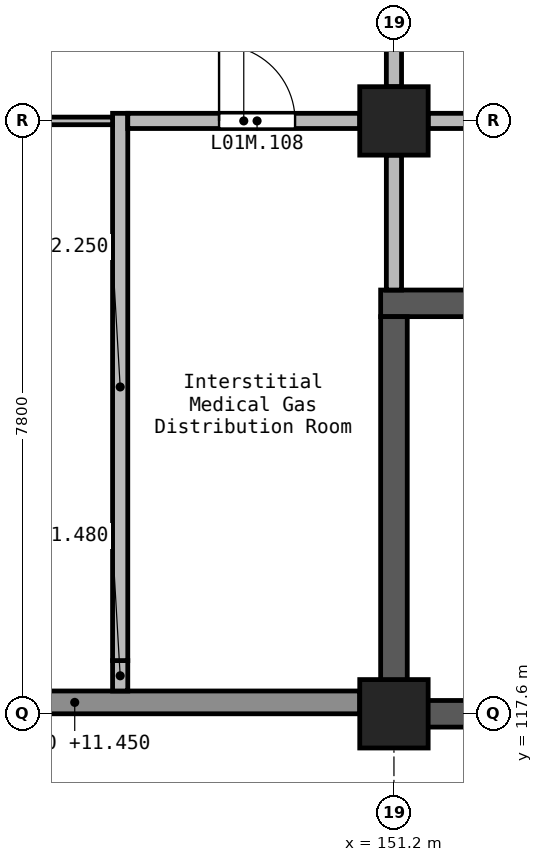
"""IFC4 building model, lengths in metres.
Left out: names, types, materials, properties, quantities, classifications, styles, units other than length and angle.
Written with IfcOpenShell. Run it as: python <this file> out.ifc"""

import sys

from ifc_helpers import new_model, si_unit, direction, frame, frame_2d, origin, origin_2d, place, context, subcontext, project, spatial, rectangle, extrude, element, fill, save


model = new_model("IFC4")
c1 = context("Model", 3, precision=1e-05, world=origin(), true_north=direction((0.0, 1.0)))
c2 = subcontext(c1, "Body", "Model", "MODEL_VIEW")
j1 = project(units=[si_unit("LENGTHUNIT", "METRE"), si_unit("PLANEANGLEUNIT", "RADIAN")], contexts=[c1])
p1 = place(None, origin())
s1 = spatial("IfcSite", under=j1, at=p1, CompositionType="ELEMENT")
p2 = place(p1, origin())
s2 = spatial("IfcBuilding", under=s1, at=p2, CompositionType="ELEMENT")
p3 = place(p2, frame((0.0, 0.0, 9.9)))
s3 = spatial("IfcBuildingStorey", under=s2, at=p3, CompositionType="ELEMENT", Elevation=9.9)
for number, where, z_axis, x_axis in (
    (1, (151.2, 117.6, 0.0), (0.0, 0.0, 1.0), (1.0, 0.0, 0.0)),
    (2, (151.2, 125.4, 0.0), (0.0, 0.0, 1.0), (1.0, 0.0, 0.0)),
):
    element("IfcColumn", number, at=place(p3, frame(where, z_axis=z_axis, x_axis=x_axis)), inside=s3, PredefinedType="COLUMN", context=c2, shape_type="SweptSolid", body=[
        extrude(rectangle(XDim=0.9, YDim=0.9, at=origin_2d()), origin(), (0.0, 0.0, 1.0), 2.7),
    ])
p4 = place(p3, frame((151.025, 123.0, 0.0), z_axis=(0.0, 0.0, 1.0), x_axis=(1.0, 0.0, 0.0)))
e3 = element("IfcWall", 3, at=p4, inside=s3, PredefinedType="SHEAR", context=c2, shape_type="SweptSolid", body=[
    extrude(rectangle(XDim=8.4, YDim=0.35, at=frame_2d((4.2, 0.0))), origin(), (0.0, 0.0, 1.0), 2.7),
])
p5 = place(p4, frame((6.875, 0.0, 0.0)))
e4 = element("IfcOpeningElement", 4, at=p5, cuts=e3, PredefinedType="OPENING", context=c2, shape_type="SweptSolid", body=[
    extrude(rectangle(XDim=1.1, YDim=2.1, at=frame_2d((0.55, 1.05))), frame((0.0, 0.185, 0.0), z_axis=(0.0, -1.0, 0.0), x_axis=(1.0, 0.0, 0.0)), (0.0, 0.0, 1.0), 0.37),
])
p6 = place(p3, frame((151.2, 117.425, 0.0), z_axis=(0.0, 0.0, 1.0), x_axis=(0.0, 1.0, 0.0)))
e5 = element("IfcWall", 5, at=p6, inside=s3, PredefinedType="SHEAR", context=c2, shape_type="SweptSolid", body=[
    extrude(rectangle(XDim=5.4, YDim=0.35, at=frame_2d((2.7, 0.0))), origin(), (0.0, 0.0, 1.0), 2.7),
])
p7 = place(p3, frame((151.375, 117.6, 0.0), z_axis=(0.0, 0.0, 1.0), x_axis=(1.0, 0.0, 0.0)))
e6 = element("IfcWall", 6, at=p7, inside=s3, PredefinedType="SHEAR", context=c2, shape_type="SweptSolid", body=[
    extrude(rectangle(XDim=8.05, YDim=0.35, at=frame_2d((4.025, 0.0))), origin(), (0.0, 0.0, 1.0), 2.7),
])
p8 = place(p3, frame((143.25, 117.75, 0.0), z_axis=(0.0, 0.0, 1.0), x_axis=(1.0, 0.0, 0.0)))
e7 = element("IfcWall", 7, at=p8, inside=s3, PredefinedType="STANDARD", context=c2, shape_type="SweptSolid", body=[
    extrude(rectangle(XDim=7.5, YDim=0.3, at=frame_2d((3.75, 0.0))), origin(), (0.0, 0.0, 1.0), 1.55),
])
p9 = place(p3, frame((151.2, 128.55, 0.0), z_axis=(0.0, 0.0, 1.0), x_axis=(0.0, -1.0, 0.0)))
e8 = element("IfcWall", 8, at=p9, inside=s3, PredefinedType="SOLIDWALL", context=c2, shape_type="SweptSolid", body=[
    extrude(rectangle(XDim=2.7, YDim=0.2, at=frame_2d((1.35, 0.0))), origin(), (0.0, 0.0, 1.0), 2.35),
])
p10 = place(p3, frame((151.2, 124.95, 0.0), z_axis=(0.0, 0.0, 1.0), x_axis=(0.0, -1.0, 0.0)))
e9 = element("IfcWall", 9, at=p10, inside=s3, PredefinedType="SOLIDWALL", context=c2, shape_type="SweptSolid", body=[
    extrude(rectangle(XDim=1.775, YDim=0.2, at=frame_2d((0.887, 0.0))), origin(), (0.0, 0.0, 1.0), 2.35),
])
p11 = place(p3, frame((159.15, 125.4, 0.0), z_axis=(0.0, 0.0, 1.0), x_axis=(-1.0, 0.0, 0.0)))
e10 = element("IfcWall", 10, at=p11, inside=s3, PredefinedType="SOLIDWALL", context=c2, shape_type="SweptSolid", body=[
    extrude(rectangle(XDim=7.5, YDim=0.2, at=frame_2d((3.75, 0.0))), origin(), (0.0, 0.0, 1.0), 2.35),
])
p12 = place(p11, frame((3.2, 0.0, 0.0)))
e11 = element("IfcOpeningElement", 11, at=p12, cuts=e10, PredefinedType="OPENING", context=c2, shape_type="SweptSolid", body=[
    extrude(rectangle(XDim=1.1, YDim=2.1, at=frame_2d((0.55, 1.05))), frame((0.0, 0.11, 0.0), z_axis=(0.0, -1.0, 0.0), x_axis=(1.0, 0.0, 0.0)), (0.0, 0.0, 1.0), 0.22),
])
p13 = place(p3, frame((147.598, 117.9, 0.0), z_axis=(0.0, 0.0, 1.0), x_axis=(0.0, 1.0, 0.0)))
e12 = element("IfcWall", 12, at=p13, inside=s3, PredefinedType="SOLIDWALL", context=c2, shape_type="SweptSolid", body=[
    extrude(rectangle(XDim=0.4, YDim=0.2, at=frame_2d((0.2, 0.0))), origin(), (0.0, 0.0, 1.0), 1.58),
])
p14 = place(p3, frame((147.598, 118.3, 0.0), z_axis=(0.0, 0.0, 1.0), x_axis=(0.0, 1.0, 0.0)))
e13 = element("IfcWall", 13, at=p14, inside=s3, PredefinedType="SOLIDWALL", context=c2, shape_type="SweptSolid", body=[
    extrude(rectangle(XDim=7.2, YDim=0.2, at=frame_2d((3.6, 0.0))), origin(), (0.0, 0.0, 1.0), 2.35),
])
p15 = place(p3, frame((147.698, 125.4, 0.0), z_axis=(0.0, 0.0, 1.0), x_axis=(1.0, 0.0, 0.0)))
e14 = element("IfcWall", 14, at=p15, inside=s3, PredefinedType="SOLIDWALL", context=c2, shape_type="SweptSolid", body=[
    extrude(rectangle(XDim=3.052, YDim=0.2, at=frame_2d((1.526, 0.0))), origin(), (0.0, 0.0, 1.0), 2.35),
])
p16 = place(p15, frame((1.201, 0.0, 0.0)))
e15 = element("IfcOpeningElement", 15, at=p16, cuts=e14, PredefinedType="OPENING", context=c2, shape_type="SweptSolid", body=[
    extrude(rectangle(XDim=1.0, YDim=2.1, at=frame_2d((0.5, 1.05))), frame((0.0, 0.11, 0.0), z_axis=(0.0, -1.0, 0.0), x_axis=(1.0, 0.0, 0.0)), (0.0, 0.0, 1.0), 0.22),
])
p17 = place(p3, frame((143.25, 125.4, 0.0), z_axis=(0.0, 0.0, 1.0), x_axis=(1.0, 0.0, 0.0)))
e16 = element("IfcWall", 16, at=p17, inside=s3, PredefinedType="PARTITIONING", context=c2, shape_type="SweptSolid", body=[
    extrude(rectangle(XDim=4.248, YDim=0.1, at=frame_2d((2.124, 0.0))), origin(), (0.0, 0.0, 1.0), 2.35),
])
p18 = place(p17, frame((0.298, 0.0, 0.0)))
e17 = element("IfcOpeningElement", 17, at=p18, cuts=e16, PredefinedType="OPENING", context=c2, shape_type="SweptSolid", body=[
    extrude(rectangle(XDim=0.9, YDim=2.1, at=frame_2d((0.45, 1.05))), frame((0.0, 0.06, 0.0), z_axis=(0.0, -1.0, 0.0), x_axis=(1.0, 0.0, 0.0)), (0.0, 0.0, 1.0), 0.12),
])
p19 = place(p16, frame((1.0, 0.0, 0.0), z_axis=(0.0, 0.0, 1.0), x_axis=(-1.0, 0.0, 0.0)))
e18 = element("IfcDoor", 18, at=p19, inside=s3, OperationType="SINGLE_SWING_LEFT", PredefinedType="DOOR", context=c2, shape_type="SweptSolid", body=[
    extrude(rectangle(XDim=1.0, YDim=2.1, at=frame_2d((0.5, 1.05))), frame((0.0, 0.025, 0.0), z_axis=(0.0, -1.0, 0.0), x_axis=(1.0, 0.0, 0.0)), (0.0, 0.0, 1.0), 0.05),
])
fill(e15, e18)
save(model, sys.argv[1])
